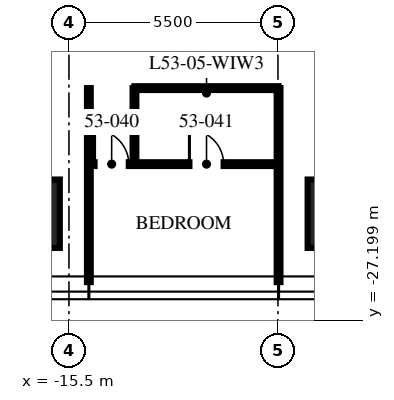
"""IFC4 building model, lengths in metres.
Left out: names, types, materials, properties, quantities, classifications, styles, units other than length and angle.
Written with IfcOpenShell. Run it as: python <this file> out.ifc"""

import sys

from ifc_helpers import new_model, si_unit, direction, frame, frame_2d, origin, origin_2d, place, context, subcontext, project, spatial, rectangle, extrude, element, fill, save


model = new_model("IFC4")
c1 = context("Model", 3, precision=1e-05, world=origin(), true_north=direction((0.0, 1.0)))
c2 = subcontext(c1, "Body", "Model", "MODEL_VIEW")
j1 = project(units=[si_unit("LENGTHUNIT", "METRE"), si_unit("PLANEANGLEUNIT", "RADIAN")], contexts=[c1])
p1 = place(None, origin())
s1 = spatial("IfcSite", under=j1, at=p1, CompositionType="ELEMENT")
p2 = place(p1, origin())
s2 = spatial("IfcBuilding", under=s1, at=p2, CompositionType="ELEMENT")
p3 = place(p2, frame((0.0, 0.0, 214.5)))
s3 = spatial("IfcBuildingStorey", under=s2, at=p3, CompositionType="ELEMENT", Elevation=214.5)
for number, where, z_axis, x_axis in (
    (1, (-8.32, -24.4, 0.0), (0.0, 0.0, 1.0), (1.0, 0.0, 0.0)),
    (2, (-16.64, -24.4, 0.0), (0.0, 0.0, 1.0), (1.0, 0.0, 0.0)),
):
    element("IfcColumn", number, at=place(p3, frame(where, z_axis=z_axis, x_axis=x_axis)), inside=s3, PredefinedType="COLUMN", context=c2, shape_type="SweptSolid", body=[
        extrude(rectangle(XDim=1.8, YDim=1.8, at=origin_2d()), origin(), (0.0, 0.0, 1.0), 3.75),
    ])
for number, where, z_axis, x_axis in (
    (3, (-14.976, -21.095, 0.0), (0.0, 0.0, 1.0), (0.0, -1.0, 0.0)),
    (4, (-9.984, -21.095, 0.0), (0.0, 0.0, 1.0), (0.0, -1.0, 0.0)),
):
    element("IfcWall", number, at=place(p3, frame(where, z_axis=z_axis, x_axis=x_axis)), inside=s3, PredefinedType="PARTITIONING", context=c2, shape_type="SweptSolid", body=[
        extrude(rectangle(XDim=5.105, YDim=0.1, at=frame_2d((2.552, 0.0))), origin(), (0.0, 0.0, 1.0), 2.91),
    ])
p4 = place(p3, frame((-14.976, -23.095, 0.0), z_axis=(0.0, 0.0, 1.0), x_axis=(1.0, 0.0, 0.0)))
e5 = element("IfcWall", 5, at=p4, inside=s3, PredefinedType="PARTITIONING", context=c2, shape_type="SweptSolid", body=[
    extrude(rectangle(XDim=4.992, YDim=0.1, at=frame_2d((2.496, 0.0))), origin(), (0.0, 0.0, 1.0), 2.81),
])
p5 = place(p4, frame((0.15, 0.0, 0.0)))
e6 = element("IfcOpeningElement", 6, at=p5, cuts=e5, PredefinedType="OPENING", context=c2, shape_type="SweptSolid", body=[
    extrude(rectangle(XDim=0.9, YDim=2.1, at=frame_2d((0.45, 1.05))), frame((0.0, 0.06, 0.0), z_axis=(0.0, -1.0, 0.0), x_axis=(1.0, 0.0, 0.0)), (0.0, 0.0, 1.0), 0.12),
])
p6 = place(p4, frame((2.646, 0.0, 0.0)))
e7 = element("IfcOpeningElement", 7, at=p6, cuts=e5, PredefinedType="OPENING", context=c2, shape_type="SweptSolid", body=[
    extrude(rectangle(XDim=0.9, YDim=2.1, at=frame_2d((0.45, 1.05))), frame((0.0, 0.06, 0.0), z_axis=(0.0, -1.0, 0.0), x_axis=(1.0, 0.0, 0.0)), (0.0, 0.0, 1.0), 0.12),
])
p7 = place(p3, frame((-13.776, -21.095, 0.0), z_axis=(0.0, 0.0, 1.0), x_axis=(0.0, -1.0, 0.0)))
e8 = element("IfcWall", 8, at=p7, inside=s3, PredefinedType="PARTITIONING", context=c2, shape_type="SweptSolid", body=[
    extrude(rectangle(XDim=2.0, YDim=0.1, at=frame_2d((1.0, 0.0))), origin(), (0.0, 0.0, 1.0), 3.5),
])
p8 = place(p3, frame((-13.776, -21.095, 0.0), z_axis=(0.0, 0.0, 1.0), x_axis=(1.0, 0.0, 0.0)))
e9 = element("IfcWall", 9, at=p8, inside=s3, PredefinedType="PARTITIONING", context=c2, shape_type="SweptSolid", body=[
    extrude(rectangle(XDim=3.792, YDim=0.1, at=frame_2d((1.896, 0.0))), origin(), (0.0, 0.0, 1.0), 2.81),
])
p9 = place(p5, origin())
e10 = element("IfcDoor", 10, at=p9, inside=s3, OperationType="SINGLE_SWING_LEFT", PredefinedType="DOOR", context=c2, shape_type="SweptSolid", body=[
    extrude(rectangle(XDim=0.9, YDim=2.1, at=frame_2d((0.45, 1.05))), frame((0.0, 0.025, 0.0), z_axis=(0.0, -1.0, 0.0), x_axis=(1.0, 0.0, 0.0)), (0.0, 0.0, 1.0), 0.05),
])
fill(e6, e10)
p10 = place(p6, origin())
e11 = element("IfcDoor", 11, at=p10, inside=s3, OperationType="SINGLE_SWING_LEFT", PredefinedType="DOOR", context=c2, shape_type="SweptSolid", body=[
    extrude(rectangle(XDim=0.9, YDim=2.1, at=frame_2d((0.45, 1.05))), frame((0.0, 0.025, 0.0), z_axis=(0.0, -1.0, 0.0), x_axis=(1.0, 0.0, 0.0)), (0.0, 0.0, 1.0), 0.05),
])
fill(e7, e11)
save(model, sys.argv[1])
